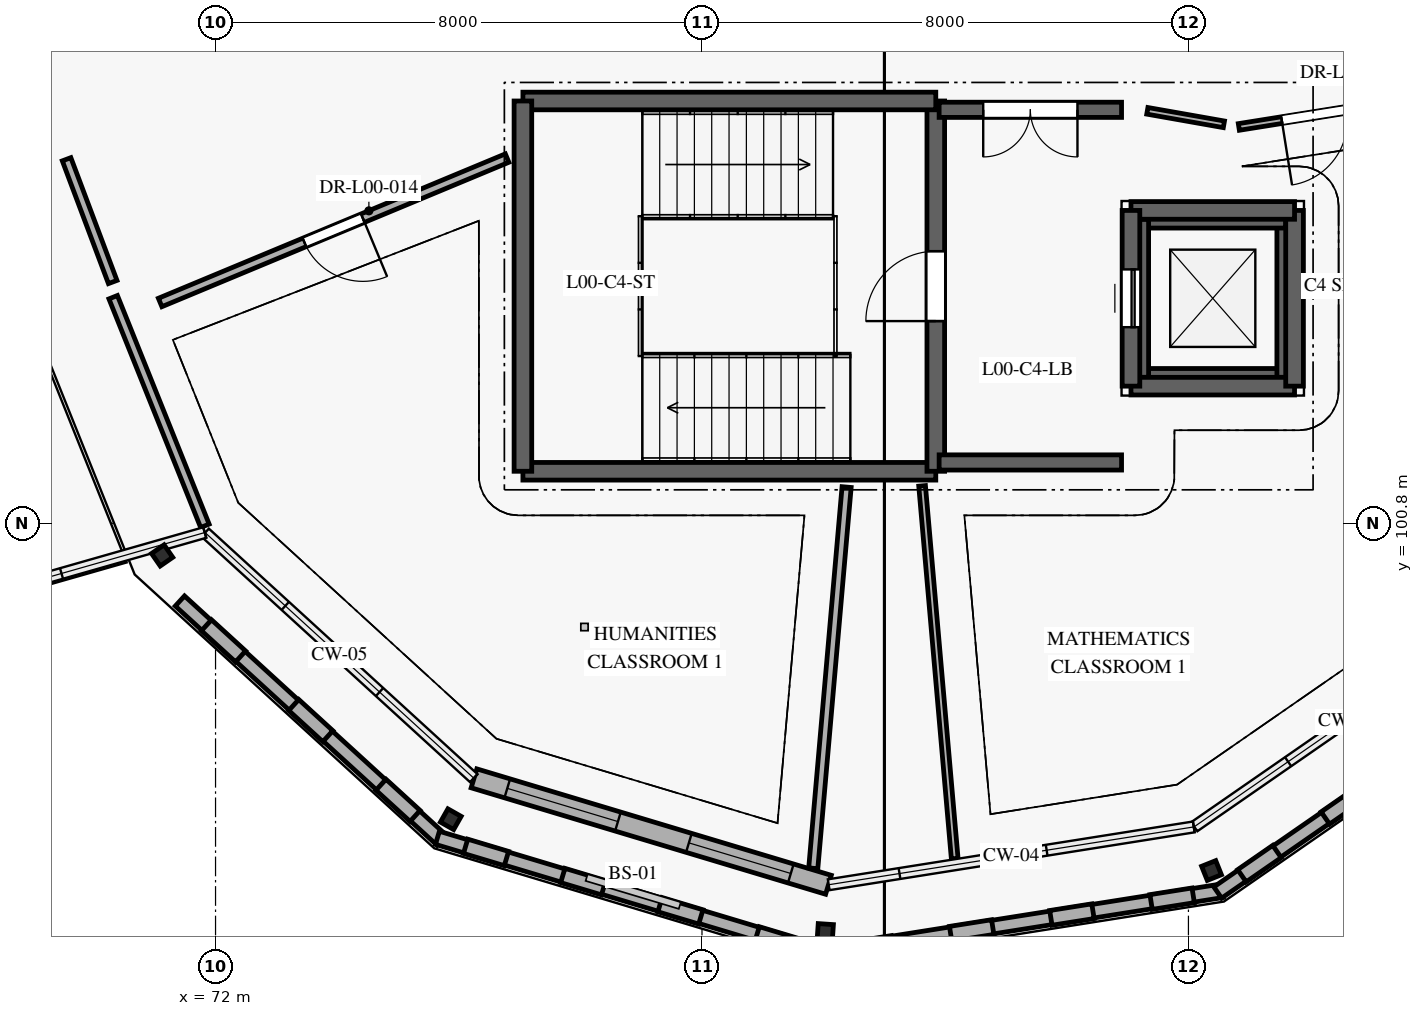
"""IFC4 building model, lengths in metres.
Left out: names, types, materials, properties, quantities, classifications, styles, units other than length and angle.
Written with IfcOpenShell. Run it as: python <this file> out.ifc"""

import sys

from ifc_helpers import new_model, si_unit, direction, frame, frame_2d, origin, origin_2d, place, context, subcontext, project, spatial, rectangle, hollow_rectangle, extrude, element, fill, save


model = new_model("IFC4")
c1 = context("Model", 3, precision=1e-05, world=origin(), true_north=direction((0.0, 1.0)))
c2 = subcontext(c1, "Body", "Model", "MODEL_VIEW")
j1 = project(units=[si_unit("LENGTHUNIT", "METRE"), si_unit("PLANEANGLEUNIT", "RADIAN")], contexts=[c1])
p1 = place(None, origin())
s1 = spatial("IfcSite", under=j1, at=p1, CompositionType="ELEMENT")
p2 = place(p1, origin())
s2 = spatial("IfcBuilding", under=s1, at=p2, CompositionType="ELEMENT")
p3 = place(p2, origin())
s3 = spatial("IfcBuildingStorey", under=s2, at=p3, CompositionType="ELEMENT", Elevation=0.0)
for number, where, z_axis, x_axis in (
    (1, (71.122, 100.271, 0.0), (0.0, 0.0, 1.0), (0.569, -0.822, 0.0)),
    (2, (75.869, 95.932, 0.0), (0.0, 0.0, 1.0), (0.87, -0.493, 0.0)),
    (3, (82.028, 94.083, 0.0), (0.0, 0.0, 1.0), (0.998, -0.067, 0.0)),
    (4, (88.38, 95.089, 0.0), (0.0, 0.0, 1.0), (0.928, 0.372, 0.0)),
):
    element("IfcColumn", number, at=place(p3, frame(where, z_axis=z_axis, x_axis=x_axis)), inside=s3, PredefinedType="COLUMN", context=c2, shape_type="SweptSolid", body=[
        extrude(hollow_rectangle(XDim=0.25, YDim=0.25, WallThickness=0.012, InnerFilletRadius=0.012, OuterFilletRadius=0.019, at=origin_2d()), origin(), (0.0, 0.0, 1.0), 4.2),
    ])
p4 = place(p3, frame((62.41, 107.276, 0.0), z_axis=(0.0, 0.0, 1.0), x_axis=(0.961523947641, 0.274721127897, 0.0)))
e5 = element("IfcWall", 5, at=p4, inside=s3, PredefinedType="SOLIDWALL", context=c2, shape_type="SweptSolid", body=[
    extrude(rectangle(XDim=7.575, YDim=0.35, at=frame_2d((3.788, 0.0))), origin(), (0.0, 0.0, 1.0), 3.94),
])
p5 = place(p4, frame((0.919, 0.0, 0.85)))
e6 = element("IfcOpeningElement", 6, at=p5, cuts=e5, PredefinedType="OPENING", context=c2, shape_type="SweptSolid", body=[
    extrude(rectangle(XDim=1.95, YDim=1.6, at=frame_2d((0.975, 0.8))), frame((0.0, 0.185, 0.0), z_axis=(0.0, -1.0, 0.0), x_axis=(1.0, 0.0, 0.0)), (0.0, 0.0, 1.0), 0.37),
])
p6 = place(p4, frame((4.631, 0.0, 0.85)))
e7 = element("IfcOpeningElement", 7, at=p6, cuts=e5, PredefinedType="OPENING", context=c2, shape_type="SweptSolid", body=[
    extrude(rectangle(XDim=2.1, YDim=1.6, at=frame_2d((1.05, 0.8))), frame((0.0, 0.185, 0.0), z_axis=(0.0, -1.0, 0.0), x_axis=(1.0, 0.0, 0.0)), (0.0, 0.0, 1.0), 0.37),
])
p7 = place(p3, frame((82.08, 94.854, 0.0), z_axis=(0.0, 0.0, 1.0), x_axis=(-0.957750075894, 0.28760179437, 0.0)))
e8 = element("IfcWall", 8, at=p7, inside=s3, PredefinedType="SOLIDWALL", context=c2, shape_type="SweptSolid", body=[
    extrude(rectangle(XDim=6.086, YDim=0.325, at=frame_2d((3.043, 0.0))), origin(), (0.0, 0.0, 1.0), 3.94),
])
p8 = place(p7, frame((0.646, 0.0, 0.85)))
e9 = element("IfcOpeningElement", 9, at=p8, cuts=e8, PredefinedType="OPENING", context=c2, shape_type="SweptSolid", body=[
    extrude(rectangle(XDim=1.75, YDim=1.8, at=frame_2d((0.875, 0.9))), frame((0.0, 0.172, 0.0), z_axis=(0.0, -1.0, 0.0), x_axis=(1.0, 0.0, 0.0)), (0.0, 0.0, 1.0), 0.345),
])
p9 = place(p7, frame((3.615, 0.0, 0.85)))
e10 = element("IfcOpeningElement", 10, at=p9, cuts=e8, PredefinedType="OPENING", context=c2, shape_type="SweptSolid", body=[
    extrude(rectangle(XDim=1.9, YDim=1.8, at=frame_2d((0.95, 0.9))), frame((0.0, 0.172, 0.0), z_axis=(0.0, -1.0, 0.0), x_axis=(1.0, 0.0, 0.0)), (0.0, 0.0, 1.0), 0.345),
])
p10 = place(p3, frame((71.414, 99.521, 0.0), z_axis=(0.0, 0.0, 1.0), x_axis=(0.73814554437, -0.674641501337, 0.0)))
e11 = element("IfcWall", 11, at=p10, inside=s3, PredefinedType="ELEMENTEDWALL", context=c2, shape_type="SweptSolid", body=[
    extrude(rectangle(XDim=5.832, YDim=0.225, at=frame_2d((2.916, 0.0))), origin(), (0.0, 0.0, 1.0), 0.55),
])
p11 = place(p3, frame((71.851, 99.122, 0.55), z_axis=(0.0, 0.0, 1.0), x_axis=(0.738033381673, -0.674764201434, 0.0)))
e12 = element("IfcWall", 12, at=p11, inside=s3, PredefinedType="ELEMENTEDWALL", context=c2, shape_type="SweptSolid", body=[
    extrude(rectangle(XDim=0.76, YDim=0.245, at=frame_2d((0.38, 0.0))), origin(), (0.0, 0.0, 1.0), 3.39),
])
p12 = place(p3, frame((73.286, 97.811, 0.55), z_axis=(0.0, 0.0, 1.0), x_axis=(0.738047098779, -0.674749197839, 0.0)))
e13 = element("IfcWall", 13, at=p12, inside=s3, PredefinedType="ELEMENTEDWALL", context=c2, shape_type="SweptSolid", body=[
    extrude(rectangle(XDim=0.76, YDim=0.245, at=frame_2d((0.38, 0.0))), origin(), (0.0, 0.0, 1.0), 3.39),
])
p13 = place(p3, frame((74.721, 96.499, 0.55), z_axis=(0.0, 0.0, 1.0), x_axis=(0.738033381673, -0.674764201434, 0.0)))
e14 = element("IfcWall", 14, at=p13, inside=s3, PredefinedType="ELEMENTEDWALL", context=c2, shape_type="SweptSolid", body=[
    extrude(rectangle(XDim=0.76, YDim=0.245, at=frame_2d((0.38, 0.0))), origin(), (0.0, 0.0, 1.0), 3.39),
])
p14 = place(p3, frame((75.649, 95.626, 0.0), z_axis=(0.0, 0.0, 1.0), x_axis=(0.957749751871, -0.287602873404, 0.0)))
e15 = element("IfcWall", 15, at=p14, inside=s3, PredefinedType="ELEMENTEDWALL", context=c2, shape_type="SweptSolid", body=[
    extrude(rectangle(XDim=6.676, YDim=0.225, at=frame_2d((3.338, 0.0))), origin(), (0.0, 0.0, 1.0), 0.55),
])
for number, where, z_axis, x_axis in (
    (16, (76.113, 95.487, 0.55), (0.0, 0.0, 1.0), (0.958, -0.288, 0.0)),
    (17, (77.711, 95.007, 0.55), (0.0, 0.0, 1.0), (0.958, -0.288, 0.0)),
    (18, (79.31, 94.527, 0.55), (0.0, 0.0, 1.0), (0.958, -0.287, 0.0)),
    (19, (80.908, 94.047, 0.55), (0.0, 0.0, 1.0), (0.958, -0.287, 0.0)),
):
    element("IfcWall", number, at=place(p3, frame(where, z_axis=z_axis, x_axis=x_axis)), inside=s3, PredefinedType="ELEMENTEDWALL", context=c2, shape_type="SweptSolid", body=[
        extrude(rectangle(XDim=0.701, YDim=0.245, at=frame_2d((0.351, 0.0))), origin(), (0.0, 0.0, 1.0), 3.39),
    ])
p15 = place(p3, frame((81.963, 93.712, 0.0), z_axis=(0.0, 0.0, 1.0), x_axis=(0.987690206406, 0.156422684322, 0.0)))
e20 = element("IfcWall", 20, at=p15, inside=s3, PredefinedType="ELEMENTEDWALL", context=c2, shape_type="SweptSolid", body=[
    extrude(rectangle(XDim=6.676, YDim=0.225, at=frame_2d((3.338, 0.0))), origin(), (0.0, 0.0, 1.0), 0.55),
])
for number, where, z_axis, x_axis in (
    (21, (82.441, 93.788, 0.55), (0.0, 0.0, 1.0), (0.988, 0.156, 0.0)),
    (22, (84.089, 94.049, 0.55), (0.0, 0.0, 1.0), (0.988, 0.156, 0.0)),
    (23, (85.738, 94.31, 0.55), (0.0, 0.0, 1.0), (0.988, 0.156, 0.0)),
    (24, (87.386, 94.571, 0.55), (0.0, 0.0, 1.0), (0.988, 0.156, 0.0)),
):
    element("IfcWall", number, at=place(p3, frame(where, z_axis=z_axis, x_axis=x_axis)), inside=s3, PredefinedType="ELEMENTEDWALL", context=c2, shape_type="SweptSolid", body=[
        extrude(rectangle(XDim=0.701, YDim=0.245, at=frame_2d((0.351, 0.0))), origin(), (0.0, 0.0, 1.0), 3.39),
    ])
p16 = place(p3, frame((88.482, 94.726, 0.0), z_axis=(0.0, 0.0, 1.0), x_axis=(0.822009139105, 0.56947429725, 0.0)))
e25 = element("IfcWall", 25, at=p16, inside=s3, PredefinedType="ELEMENTEDWALL", context=c2, shape_type="SweptSolid", body=[
    extrude(rectangle(XDim=6.676, YDim=0.225, at=frame_2d((3.338, 0.0))), origin(), (0.0, 0.0, 1.0), 0.55),
])
for number, where, z_axis, x_axis in (
    (26, (88.88, 95.002, 0.55), (0.0, 0.0, 1.0), (0.822, 0.569, 0.0)),
    (27, (90.252, 95.952, 0.55), (0.0, 0.0, 1.0), (0.822, 0.569, 0.0)),
):
    element("IfcWall", number, at=place(p3, frame(where, z_axis=z_axis, x_axis=x_axis)), inside=s3, PredefinedType="ELEMENTEDWALL", context=c2, shape_type="SweptSolid", body=[
        extrude(rectangle(XDim=0.701, YDim=0.245, at=frame_2d((0.351, 0.0))), origin(), (0.0, 0.0, 1.0), 3.39),
    ])
p17 = place(p3, frame((87.2, 103.2, -1.4), z_axis=(0.0, 0.0, 1.0), x_axis=(1.0, 0.0, 0.0)))
e28 = element("IfcWall", 28, at=p17, inside=s3, PredefinedType="SHEAR", context=c2, shape_type="SweptSolid", body=[
    extrude(rectangle(XDim=2.4, YDim=0.29, at=frame_2d((1.2, 0.0))), origin(), (0.0, 0.0, 1.0), 1.4),
])
p18 = place(p3, frame((89.6, 103.2, -1.4), z_axis=(0.0, 0.0, 1.0), x_axis=(0.0, 1.0, 0.0)))
e29 = element("IfcWall", 29, at=p18, inside=s3, PredefinedType="SHEAR", context=c2, shape_type="SweptSolid", body=[
    extrude(rectangle(XDim=2.6, YDim=0.29, at=frame_2d((1.3, 0.0))), origin(), (0.0, 0.0, 1.0), 1.4),
])
p19 = place(p3, frame((89.6, 105.8, -1.4), z_axis=(0.0, 0.0, 1.0), x_axis=(-1.0, 0.0, 0.0)))
e30 = element("IfcWall", 30, at=p19, inside=s3, PredefinedType="SHEAR", context=c2, shape_type="SweptSolid", body=[
    extrude(rectangle(XDim=2.4, YDim=0.29, at=frame_2d((1.2, 0.0))), origin(), (0.0, 0.0, 1.0), 1.4),
])
p20 = place(p3, frame((87.2, 105.8, -1.4), z_axis=(0.0, 0.0, 1.0), x_axis=(0.0, -1.0, 0.0)))
e31 = element("IfcWall", 31, at=p20, inside=s3, PredefinedType="SHEAR", context=c2, shape_type="SweptSolid", body=[
    extrude(rectangle(XDim=2.6, YDim=0.29, at=frame_2d((1.3, 0.0))), origin(), (0.0, 0.0, 1.0), 1.4),
])
p21 = place(p3, frame((77.055, 101.655, 0.0), z_axis=(0.0, 0.0, 1.0), x_axis=(1.0, 0.0, 0.0)))
e32 = element("IfcWall", 32, at=p21, inside=s3, PredefinedType="SHEAR", context=c2, shape_type="SweptSolid", body=[
    extrude(rectangle(XDim=6.79, YDim=0.29, at=frame_2d((3.395, 0.0))), origin(), (0.0, 0.0, 1.0), 3.95),
])
p22 = place(p3, frame((83.845, 101.655, 0.0), z_axis=(0.0, 0.0, 1.0), x_axis=(0.0, 1.0, 0.0)))
e33 = element("IfcWall", 33, at=p22, inside=s3, PredefinedType="SHEAR", context=c2, shape_type="SweptSolid", body=[
    extrude(rectangle(XDim=6.09, YDim=0.29, at=frame_2d((3.045, 0.0))), origin(), (0.0, 0.0, 1.0), 3.95),
])
p23 = place(p22, frame((2.47, 0.0, 0.0)))
e34 = element("IfcOpeningElement", 34, at=p23, cuts=e33, PredefinedType="OPENING", context=c2, shape_type="SweptSolid", body=[
    extrude(rectangle(XDim=1.15, YDim=2.1, at=frame_2d((0.575, 1.05))), frame((0.0, 0.155, 0.0), z_axis=(0.0, -1.0, 0.0), x_axis=(1.0, 0.0, 0.0)), (0.0, 0.0, 1.0), 0.31),
])
p24 = place(p3, frame((83.845, 107.745, 0.0), z_axis=(0.0, 0.0, 1.0), x_axis=(-1.0, 0.0, 0.0)))
e35 = element("IfcWall", 35, at=p24, inside=s3, PredefinedType="SHEAR", context=c2, shape_type="SweptSolid", body=[
    extrude(rectangle(XDim=6.79, YDim=0.29, at=frame_2d((3.395, 0.0))), origin(), (0.0, 0.0, 1.0), 3.95),
])
p25 = place(p3, frame((77.055, 107.745, 0.0), z_axis=(0.0, 0.0, 1.0), x_axis=(0.0, -1.0, 0.0)))
e36 = element("IfcWall", 36, at=p25, inside=s3, PredefinedType="SHEAR", context=c2, shape_type="SweptSolid", body=[
    extrude(rectangle(XDim=6.09, YDim=0.29, at=frame_2d((3.045, 0.0))), origin(), (0.0, 0.0, 1.0), 3.95),
])
p26 = place(p3, frame((87.055, 103.055, 0.0), z_axis=(0.0, 0.0, 1.0), x_axis=(1.0, 0.0, 0.0)))
e37 = element("IfcWall", 37, at=p26, inside=s3, PredefinedType="SHEAR", context=c2, shape_type="SweptSolid", body=[
    extrude(rectangle(XDim=2.69, YDim=0.29, at=frame_2d((1.345, 0.0))), origin(), (0.0, 0.0, 1.0), 3.95),
])
p27 = place(p3, frame((89.745, 103.055, 0.0), z_axis=(0.0, 0.0, 1.0), x_axis=(0.0, 1.0, 0.0)))
e38 = element("IfcWall", 38, at=p27, inside=s3, PredefinedType="SHEAR", context=c2, shape_type="SweptSolid", body=[
    extrude(rectangle(XDim=2.89, YDim=0.29, at=frame_2d((1.445, 0.0))), origin(), (0.0, 0.0, 1.0), 3.95),
])
p28 = place(p3, frame((89.745, 105.945, 0.0), z_axis=(0.0, 0.0, 1.0), x_axis=(-1.0, 0.0, 0.0)))
e39 = element("IfcWall", 39, at=p28, inside=s3, PredefinedType="SHEAR", context=c2, shape_type="SweptSolid", body=[
    extrude(rectangle(XDim=2.69, YDim=0.29, at=frame_2d((1.345, 0.0))), origin(), (0.0, 0.0, 1.0), 3.95),
])
p29 = place(p3, frame((87.055, 105.945, 0.0), z_axis=(0.0, 0.0, 1.0), x_axis=(0.0, -1.0, 0.0)))
e40 = element("IfcWall", 40, at=p29, inside=s3, PredefinedType="SHEAR", context=c2, shape_type="SweptSolid", body=[
    extrude(rectangle(XDim=2.89, YDim=0.29, at=frame_2d((1.445, 0.0))), origin(), (0.0, 0.0, 1.0), 3.95),
])
p30 = place(p29, frame((0.97, 0.0, 0.0)))
e41 = element("IfcOpeningElement", 41, at=p30, cuts=e40, PredefinedType="OPENING", context=c2, shape_type="SweptSolid", body=[
    extrude(rectangle(XDim=0.95, YDim=2.1, at=frame_2d((0.475, 1.05))), frame((0.0, 0.155, 0.0), z_axis=(0.0, -1.0, 0.0), x_axis=(1.0, 0.0, 0.0)), (0.0, 0.0, 1.0), 0.31),
])
p31 = place(p3, frame((83.9, 101.8, 0.0), z_axis=(0.0, 0.0, 1.0), x_axis=(1.0, 0.0, 0.0)))
e42 = element("IfcWall", 42, at=p31, inside=s3, PredefinedType="SHEAR", context=c2, shape_type="SweptSolid", body=[
    extrude(rectangle(XDim=3.0, YDim=0.25, at=frame_2d((1.5, 0.0))), origin(), (0.0, 0.0, 1.0), 3.95),
])
p32 = place(p3, frame((86.9, 107.6, 0.0), z_axis=(0.0, 0.0, 1.0), x_axis=(-1.0, 0.0, 0.0)))
e43 = element("IfcWall", 43, at=p32, inside=s3, PredefinedType="SHEAR", context=c2, shape_type="SweptSolid", body=[
    extrude(rectangle(XDim=3.0, YDim=0.25, at=frame_2d((1.5, 0.0))), origin(), (0.0, 0.0, 1.0), 3.95),
])
p33 = place(p32, frame((0.725, 0.0, 0.0)))
e44 = element("IfcOpeningElement", 44, at=p33, cuts=e43, PredefinedType="OPENING", context=c2, shape_type="SweptSolid", body=[
    extrude(rectangle(XDim=1.55, YDim=2.15, at=frame_2d((0.775, 1.075))), frame((0.0, 0.135, 0.0), z_axis=(0.0, -1.0, 0.0), x_axis=(1.0, 0.0, 0.0)), (0.0, 0.0, 1.0), 0.27),
])
p34 = place(p3, frame((81.83, 95.125, 0.0), z_axis=(0.0, 0.0, 1.0), x_axis=(0.087160213677, 0.996194306926, 0.0)))
e45 = element("IfcWall", 45, at=p34, inside=s3, PredefinedType="PARTITIONING", context=c2, shape_type="SweptSolid", body=[
    extrude(rectangle(XDim=6.294, YDim=0.15, at=frame_2d((3.147, 0.0))), origin(), (0.0, 0.0, 1.0), 3.93),
])
p35 = place(p3, frame((76.795, 106.806, 0.0), z_axis=(0.0, 0.0, 1.0), x_axis=(-0.923221773157, -0.38426755987, 0.0)))
e46 = element("IfcWall", 46, at=p35, inside=s3, PredefinedType="PARTITIONING", context=c2, shape_type="SweptSolid", body=[
    extrude(rectangle(XDim=6.181, YDim=0.15, at=frame_2d((3.09, 0.0))), origin(), (0.0, 0.0, 1.0), 3.93),
])
p36 = place(p35, frame((2.57, 0.0, 0.0)))
e47 = element("IfcOpeningElement", 47, at=p36, cuts=e46, PredefinedType="OPENING", context=c2, shape_type="SweptSolid", body=[
    extrude(rectangle(XDim=1.04, YDim=2.1, at=frame_2d((0.52, 1.05))), frame((0.0, 0.085, 0.0), z_axis=(0.0, -1.0, 0.0), x_axis=(1.0, 0.0, 0.0)), (0.0, 0.0, 1.0), 0.17),
])
p37 = place(p3, frame((70.317, 104.518, 0.0), z_axis=(0.0, 0.0, 1.0), x_axis=(0.372284009279, -0.928118859002, 0.0)))
e48 = element("IfcWall", 48, at=p37, inside=s3, PredefinedType="PARTITIONING", context=c2, shape_type="SweptSolid", body=[
    extrude(rectangle(XDim=4.052, YDim=0.15, at=frame_2d((2.026, 0.0))), origin(), (0.0, 0.0, 1.0), 3.93),
])
p38 = place(p3, frame((83.62, 101.415, 0.0), z_axis=(0.0, 0.0, 1.0), x_axis=(0.087155139679, -0.996194750853, 0.0)))
e49 = element("IfcWall", 49, at=p38, inside=s3, PredefinedType="PARTITIONING", context=c2, shape_type="SweptSolid", body=[
    extrude(rectangle(XDim=6.154, YDim=0.11, at=frame_2d((3.077, 0.0))), origin(), (0.0, 0.0, 1.0), 3.93),
])
p39 = place(p3, frame((91.306, 107.712, 0.0), z_axis=(0.0, 0.0, 1.0), x_axis=(-0.987549736028, -0.157307084615, 0.0)))
e50 = element("IfcWall", 50, at=p39, inside=s3, PredefinedType="PARTITIONING", context=c2, shape_type="SweptSolid", body=[
    extrude(rectangle(XDim=2.508, YDim=0.11, at=frame_2d((1.254, 0.0))), origin(), (0.0, 0.0, 1.0), 3.93),
])
p40 = place(p39, frame((0.714, 0.0, 0.0)))
e51 = element("IfcOpeningElement", 51, at=p40, cuts=e50, PredefinedType="OPENING", context=c2, shape_type="SweptSolid", body=[
    extrude(rectangle(XDim=1.08, YDim=2.12, at=frame_2d((0.54, 1.06))), frame((0.0, 0.065, 0.0), z_axis=(0.0, -1.0, 0.0), x_axis=(1.0, 0.0, 0.0)), (0.0, 0.0, 1.0), 0.13),
])
p41 = place(p3, frame((88.583, 107.361, 0.0), z_axis=(0.0, 0.0, 1.0), x_axis=(-0.984779713003, 0.173807125452, 0.0)))
e52 = element("IfcWall", 52, at=p41, inside=s3, PredefinedType="PARTITIONING", context=c2, shape_type="SweptSolid", body=[
    extrude(rectangle(XDim=1.278, YDim=0.11, at=frame_2d((0.639, 0.0))), origin(), (0.0, 0.0, 1.0), 3.93),
])
p42 = place(p3, frame((70.309, 104.768, 0.0), z_axis=(0.0, 0.0, 1.0), x_axis=(-0.351594799408, 0.936152283034, 0.0)))
e53 = element("IfcWall", 53, at=p42, inside=s3, PredefinedType="PARTITIONING", context=c2, shape_type="SweptSolid", body=[
    extrude(rectangle(XDim=2.157, YDim=0.15, at=frame_2d((1.078, 0.0))), origin(), (0.0, 0.0, 1.0), 3.93),
])
p43 = place(p8, origin())
e54 = element("IfcWindow", 54, at=p43, inside=s3, PartitioningType="SINGLE_PANEL", PredefinedType="WINDOW", context=c2, shape_type="SweptSolid", body=[
    extrude(rectangle(XDim=1.75, YDim=1.8, at=frame_2d((0.875, 0.9))), frame((0.0, 0.03, 0.0), z_axis=(0.0, -1.0, 0.0), x_axis=(1.0, 0.0, 0.0)), (0.0, 0.0, 1.0), 0.06),
])
fill(e9, e54)
p44 = place(p9, origin())
e55 = element("IfcWindow", 55, at=p44, inside=s3, PartitioningType="SINGLE_PANEL", PredefinedType="WINDOW", context=c2, shape_type="SweptSolid", body=[
    extrude(rectangle(XDim=1.9, YDim=1.8, at=frame_2d((0.95, 0.9))), frame((0.0, 0.03, 0.0), z_axis=(0.0, -1.0, 0.0), x_axis=(1.0, 0.0, 0.0)), (0.0, 0.0, 1.0), 0.06),
])
fill(e10, e55)
p45 = place(p23, frame((1.15, 0.0, 0.0), z_axis=(0.0, 0.0, 1.0), x_axis=(-1.0, 0.0, 0.0)))
e56 = element("IfcDoor", 56, at=p45, inside=s3, OperationType="SINGLE_SWING_LEFT", PredefinedType="DOOR", context=c2, shape_type="SweptSolid", body=[
    extrude(rectangle(XDim=1.15, YDim=2.1, at=frame_2d((0.575, 1.05))), frame((0.0, 0.025, 0.0), z_axis=(0.0, -1.0, 0.0), x_axis=(1.0, 0.0, 0.0)), (0.0, 0.0, 1.0), 0.05),
])
fill(e34, e56)
p46 = place(p30, frame((0.95, 0.0, 0.0), z_axis=(0.0, 0.0, 1.0), x_axis=(-1.0, 0.0, 0.0)))
e57 = element("IfcDoor", 57, at=p46, inside=s3, OperationType="SLIDING_TO_LEFT", PredefinedType="DOOR", context=c2, shape_type="SweptSolid", body=[
    extrude(rectangle(XDim=0.95, YDim=2.1, at=frame_2d((0.475, 1.05))), frame((0.0, 0.025, 0.0), z_axis=(0.0, -1.0, 0.0), x_axis=(1.0, 0.0, 0.0)), (0.0, 0.0, 1.0), 0.05),
])
fill(e41, e57)
p47 = place(p33, frame((1.55, 0.0, 0.0), z_axis=(0.0, 0.0, 1.0), x_axis=(-1.0, 0.0, 0.0)))
e58 = element("IfcDoor", 58, at=p47, inside=s3, OperationType="DOUBLE_DOOR_SINGLE_SWING", PredefinedType="DOOR", context=c2, shape_type="SweptSolid", body=[
    extrude(rectangle(XDim=1.55, YDim=2.15, at=frame_2d((0.775, 1.075))), frame((0.0, 0.025, 0.0), z_axis=(0.0, -1.0, 0.0), x_axis=(1.0, 0.0, 0.0)), (0.0, 0.0, 1.0), 0.05),
])
fill(e44, e58)
p48 = place(p36, origin())
e59 = element("IfcDoor", 59, at=p48, inside=s3, OperationType="SINGLE_SWING_LEFT", PredefinedType="DOOR", context=c2, shape_type="SweptSolid", body=[
    extrude(rectangle(XDim=1.04, YDim=2.1, at=frame_2d((0.52, 1.05))), frame((0.0, 0.025, 0.0), z_axis=(0.0, -1.0, 0.0), x_axis=(1.0, 0.0, 0.0)), (0.0, 0.0, 1.0), 0.05),
])
fill(e47, e59)
p49 = place(p40, origin())
e60 = element("IfcDoor", 60, at=p49, inside=s3, OperationType="SINGLE_SWING_RIGHT", PredefinedType="DOOR", context=c2, shape_type="SweptSolid", body=[
    extrude(rectangle(XDim=1.08, YDim=2.12, at=frame_2d((0.54, 1.06))), frame((0.0, 0.025, 0.0), z_axis=(0.0, -1.0, 0.0), x_axis=(1.0, 0.0, 0.0)), (0.0, 0.0, 1.0), 0.05),
])
fill(e51, e60)
save(model, sys.argv[1])
